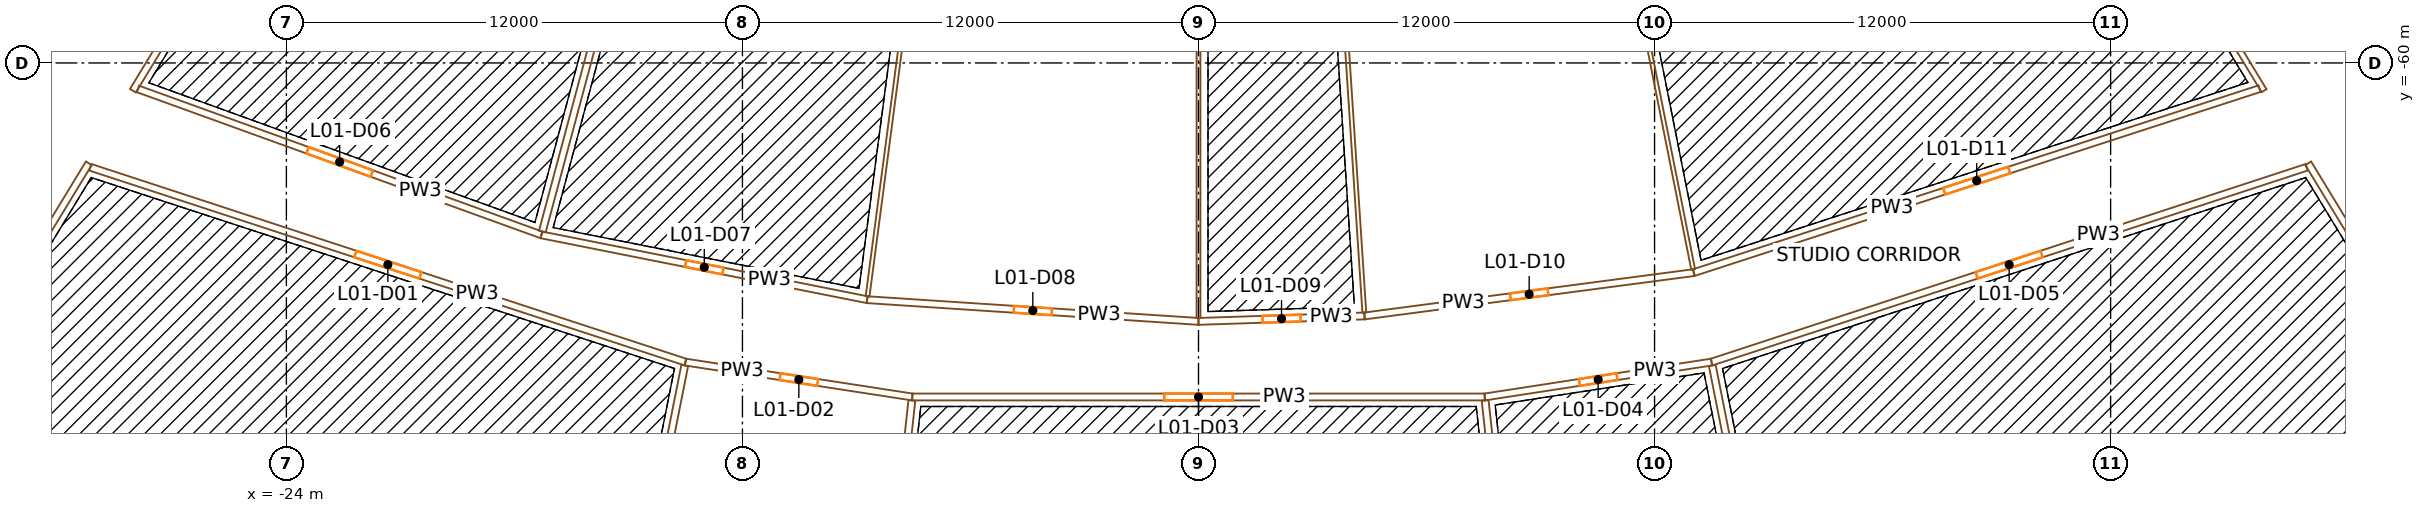
"""IFC4 building model, lengths in metres.
Left out: names, types, materials, properties, quantities, classifications, styles, units other than length and angle.
Written with IfcOpenShell. Run it as: python <this file> out.ifc"""

import sys

from ifc_helpers import new_model, si_unit, direction, frame, frame_2d, origin, place, context, subcontext, project, spatial, rectangle, extrude, element, fill, save


model = new_model("IFC4")
c1 = context("Model", 3, precision=1e-05, world=origin(), true_north=direction((0.0, 1.0)))
c2 = subcontext(c1, "Body", "Model", "MODEL_VIEW")
j1 = project(units=[si_unit("LENGTHUNIT", "METRE"), si_unit("PLANEANGLEUNIT", "RADIAN")], contexts=[c1])
p1 = place(None, origin())
s1 = spatial("IfcSite", under=j1, at=p1, CompositionType="ELEMENT")
p2 = place(p1, origin())
s2 = spatial("IfcBuilding", under=s1, at=p2, CompositionType="ELEMENT")
p3 = place(p2, frame((0.0, 0.0, 9.0)))
s3 = spatial("IfcBuildingStorey", under=s2, at=p3, CompositionType="ELEMENT", Elevation=9.0)
p4 = place(p3, frame((-36.717, -66.337, 0.0), z_axis=(0.0, 0.0, 1.0), x_axis=(0.573577477574, 0.819151315216, 0.0)))
e1 = element("IfcWall", 1, at=p4, inside=s3, PredefinedType="SHEAR", context=c2, shape_type="SweptSolid", body=[
    extrude(rectangle(XDim=14.8, YDim=0.9, at=frame_2d((7.4, 0.0))), origin(), (0.0, 0.0, 1.0), 8.6),
])
p5 = place(p4, frame((6.2, 0.0, 0.0)))
e2 = element("IfcOpeningElement", 2, at=p5, cuts=e1, PredefinedType="OPENING", context=c2, shape_type="SweptSolid", body=[
    extrude(rectangle(XDim=2.4, YDim=2.1, at=frame_2d((1.2, 1.05))), frame((0.0, 0.46, 0.0), z_axis=(0.0, -1.0, 0.0), x_axis=(1.0, 0.0, 0.0)), (0.0, 0.0, 1.0), 0.92),
])
p6 = place(p3, frame((36.717, -66.337, 0.0), z_axis=(0.0, 0.0, 1.0), x_axis=(-0.573577477574, 0.819151315216, 0.0)))
e3 = element("IfcWall", 3, at=p6, inside=s3, PredefinedType="SHEAR", context=c2, shape_type="SweptSolid", body=[
    extrude(rectangle(XDim=14.8, YDim=0.9, at=frame_2d((7.4, 0.0))), origin(), (0.0, 0.0, 1.0), 8.6),
])
p7 = place(p6, frame((6.2, 0.0, 0.0)))
e4 = element("IfcOpeningElement", 4, at=p7, cuts=e3, PredefinedType="OPENING", context=c2, shape_type="SweptSolid", body=[
    extrude(rectangle(XDim=2.4, YDim=2.1, at=frame_2d((1.2, 1.05))), frame((0.0, 0.46, 0.0), z_axis=(0.0, -1.0, 0.0), x_axis=(1.0, 0.0, 0.0)), (0.0, 0.0, 1.0), 0.92),
])
p8 = place(p3, frame((-29.199, -62.639, 0.0), z_axis=(0.0, 0.0, 1.0), x_axis=(-0.519569231187, -0.854428355103, 0.0)))
e5 = element("IfcWall", 5, at=p8, inside=s3, PredefinedType="PARTITIONING", context=c2, shape_type="SweptSolid", body=[
    extrude(rectangle(XDim=9.741, YDim=0.18, at=frame_2d((4.871, 0.0))), origin(), (0.0, 0.0, 1.0), 7.6),
])
p9 = place(p3, frame((-13.5, -67.87, 0.0), z_axis=(0.0, 0.0, 1.0), x_axis=(-0.95037928892, 0.31109356662, 0.0)))
e6 = element("IfcWall", 6, at=p9, inside=s3, PredefinedType="PARTITIONING", context=c2, shape_type="SweptSolid", body=[
    extrude(rectangle(XDim=16.477, YDim=0.18, at=frame_2d((8.239, 0.0))), origin(), (0.0, 0.0, 1.0), 7.6),
])
p10 = place(p9, frame((7.339, 0.0, 0.0)))
e7 = element("IfcOpeningElement", 7, at=p10, cuts=e6, PredefinedType="OPENING", context=c2, shape_type="SweptSolid", body=[
    extrude(rectangle(XDim=1.8, YDim=2.4, at=frame_2d((0.9, 1.2))), frame((0.0, 0.1, 0.0), z_axis=(0.0, -1.0, 0.0), x_axis=(1.0, 0.0, 0.0)), (0.0, 0.0, 1.0), 0.2),
])
p11 = place(p3, frame((-27.906, -60.683, 0.0), z_axis=(0.0, 0.0, 1.0), x_axis=(0.94036474664, -0.340167816345, 0.0)))
e8 = element("IfcWall", 8, at=p11, inside=s3, PredefinedType="PARTITIONING", context=c2, shape_type="SweptSolid", body=[
    extrude(rectangle(XDim=11.29, YDim=0.18, at=frame_2d((5.645, 0.0))), origin(), (0.0, 0.0, 1.0), 7.6),
])
p12 = place(p11, frame((4.745, 0.0, 0.0)))
e9 = element("IfcOpeningElement", 9, at=p12, cuts=e8, PredefinedType="OPENING", context=c2, shape_type="SweptSolid", body=[
    extrude(rectangle(XDim=1.8, YDim=2.1, at=frame_2d((0.9, 1.05))), frame((0.0, 0.1, 0.0), z_axis=(0.0, -1.0, 0.0), x_axis=(1.0, 0.0, 0.0)), (0.0, 0.0, 1.0), 0.2),
])
p13 = place(p3, frame((-23.174, -52.732, 0.0), z_axis=(0.0, 0.0, 1.0), x_axis=(-0.519584464565, -0.854419091654, 0.0)))
e10 = element("IfcWall", 10, at=p13, inside=s3, PredefinedType="PARTITIONING", context=c2, shape_type="SweptSolid", body=[
    extrude(rectangle(XDim=9.36, YDim=0.18, at=frame_2d((4.68, 0.0))), origin(), (0.0, 0.0, 1.0), 7.6),
])
p14 = place(p3, frame((-17.289, -64.524, 0.0), z_axis=(0.0, 0.0, 1.0), x_axis=(0.980786466832, -0.195084357342, 0.0)))
e11 = element("IfcWall", 11, at=p14, inside=s3, PredefinedType="PARTITIONING", context=c2, shape_type="SweptSolid", body=[
    extrude(rectangle(XDim=8.738, YDim=0.18, at=frame_2d((4.369, 0.0))), origin(), (0.0, 0.0, 1.0), 7.6),
])
p15 = place(p14, frame((3.869, 0.0, 0.0)))
e12 = element("IfcOpeningElement", 12, at=p15, cuts=e11, PredefinedType="OPENING", context=c2, shape_type="SweptSolid", body=[
    extrude(rectangle(XDim=1.0, YDim=2.1, at=frame_2d((0.5, 1.05))), frame((0.0, 0.1, 0.0), z_axis=(0.0, -1.0, 0.0), x_axis=(1.0, 0.0, 0.0)), (0.0, 0.0, 1.0), 0.2),
])
p16 = place(p3, frame((-16.739, -84.151, 0.0), z_axis=(0.0, 0.0, 1.0), x_axis=(0.195089444663, 0.980785454919, 0.0)))
e13 = element("IfcWall", 13, at=p16, inside=s3, PredefinedType="PARTITIONING", context=c2, shape_type="SweptSolid", body=[
    extrude(rectangle(XDim=16.51, YDim=0.18, at=frame_2d((8.255, 0.0))), origin(), (0.0, 0.0, 1.0), 7.6),
])
p17 = place(p3, frame((-7.532, -68.789, 0.0), z_axis=(0.0, 0.0, 1.0), x_axis=(-0.98836608834, 0.152093640297, 0.0)))
e14 = element("IfcWall", 14, at=p17, inside=s3, PredefinedType="PARTITIONING", context=c2, shape_type="SweptSolid", body=[
    extrude(rectangle(XDim=6.039, YDim=0.18, at=frame_2d((3.02, 0.0))), origin(), (0.0, 0.0, 1.0), 7.6),
])
p18 = place(p17, frame((2.52, 0.0, 0.0)))
e15 = element("IfcOpeningElement", 15, at=p18, cuts=e14, PredefinedType="OPENING", context=c2, shape_type="SweptSolid", body=[
    extrude(rectangle(XDim=1.0, YDim=2.1, at=frame_2d((0.5, 1.05))), frame((0.0, 0.1, 0.0), z_axis=(0.0, -1.0, 0.0), x_axis=(1.0, 0.0, 0.0)), (0.0, 0.0, 1.0), 0.2),
])
p19 = place(p3, frame((-12.965, -48.386, 0.0), z_axis=(0.0, 0.0, 1.0), x_axis=(-0.258822009397, -0.965925032004, 0.0)))
e16 = element("IfcWall", 16, at=p19, inside=s3, PredefinedType="PARTITIONING", context=c2, shape_type="SweptSolid", body=[
    extrude(rectangle(XDim=16.617, YDim=0.18, at=frame_2d((8.308, 0.0))), origin(), (0.0, 0.0, 1.0), 7.6),
])
p20 = place(p3, frame((-9.321, -85.127, 0.0), z_axis=(0.0, 0.0, 1.0), x_axis=(0.108837977541, 0.994059502568, 0.0)))
e17 = element("IfcWall", 17, at=p20, inside=s3, PredefinedType="PARTITIONING", context=c2, shape_type="SweptSolid", body=[
    extrude(rectangle(XDim=16.346, YDim=0.18, at=frame_2d((8.173, 0.0))), origin(), (0.0, 0.0, 1.0), 7.6),
])
p21 = place(p3, frame((-8.719, -66.229, 0.0), z_axis=(0.0, 0.0, 1.0), x_axis=(0.997858593599, -0.065408158359, 0.0)))
e18 = element("IfcWall", 18, at=p21, inside=s3, PredefinedType="PARTITIONING", context=c2, shape_type="SweptSolid", body=[
    extrude(rectangle(XDim=8.738, YDim=0.18, at=frame_2d((4.369, 0.0))), origin(), (0.0, 0.0, 1.0), 7.6),
])
p22 = place(p21, frame((3.869, 0.0, 0.0)))
e19 = element("IfcOpeningElement", 19, at=p22, cuts=e18, PredefinedType="OPENING", context=c2, shape_type="SweptSolid", body=[
    extrude(rectangle(XDim=1.0, YDim=2.1, at=frame_2d((0.5, 1.05))), frame((0.0, 0.1, 0.0), z_axis=(0.0, -1.0, 0.0), x_axis=(1.0, 0.0, 0.0)), (0.0, 0.0, 1.0), 0.2),
])
p23 = place(p3, frame((7.532, -68.789, 0.0), z_axis=(0.0, 0.0, 1.0), x_axis=(-1.0, 0.0, 0.0)))
e20 = element("IfcWall", 20, at=p23, inside=s3, PredefinedType="PARTITIONING", context=c2, shape_type="SweptSolid", body=[
    extrude(rectangle(XDim=15.063, YDim=0.18, at=frame_2d((7.532, 0.0))), origin(), (0.0, 0.0, 1.0), 7.6),
])
p24 = place(p23, frame((6.632, 0.0, 0.0)))
e21 = element("IfcOpeningElement", 21, at=p24, cuts=e20, PredefinedType="OPENING", context=c2, shape_type="SweptSolid", body=[
    extrude(rectangle(XDim=1.8, YDim=2.4, at=frame_2d((0.9, 1.2))), frame((0.0, 0.1, 0.0), z_axis=(0.0, -1.0, 0.0), x_axis=(1.0, 0.0, 0.0)), (0.0, 0.0, 1.0), 0.2),
])
p25 = place(p3, frame((-6.539, -49.665, 0.0), z_axis=(0.0, 0.0, 1.0), x_axis=(-0.130529385637, -0.991444440947, 0.0)))
e22 = element("IfcWall", 22, at=p25, inside=s3, PredefinedType="PARTITIONING", context=c2, shape_type="SweptSolid", body=[
    extrude(rectangle(XDim=16.616, YDim=0.1, at=frame_2d((8.308, 0.0))), origin(), (0.0, 0.0, 1.0), 7.6),
])
p26 = place(p3, frame((0.0, -66.8, 0.0), z_axis=(0.0, 0.0, 1.0), x_axis=(0.99946426167, 0.03272903366, 0.0)))
e23 = element("IfcWall", 23, at=p26, inside=s3, PredefinedType="PARTITIONING", context=c2, shape_type="SweptSolid", body=[
    extrude(rectangle(XDim=4.371, YDim=0.18, at=frame_2d((2.186, 0.0))), origin(), (0.0, 0.0, 1.0), 7.6),
])
p27 = place(p26, frame((1.686, 0.0, 0.0)))
e24 = element("IfcOpeningElement", 24, at=p27, cuts=e23, PredefinedType="OPENING", context=c2, shape_type="SweptSolid", body=[
    extrude(rectangle(XDim=1.0, YDim=2.1, at=frame_2d((0.5, 1.05))), frame((0.0, 0.1, 0.0), z_axis=(0.0, -1.0, 0.0), x_axis=(1.0, 0.0, 0.0)), (0.0, 0.0, 1.0), 0.2),
])
p28 = place(p3, frame((0.0, -50.094, 0.0), z_axis=(0.0, 0.0, 1.0), x_axis=(0.0, -1.0, 0.0)))
e25 = element("IfcWall", 25, at=p28, inside=s3, PredefinedType="PARTITIONING", context=c2, shape_type="SweptSolid", body=[
    extrude(rectangle(XDim=16.616, YDim=0.1, at=frame_2d((8.308, 0.0))), origin(), (0.0, 0.0, 1.0), 7.6),
])
p29 = place(p3, frame((3.283, -50.093, 0.0), z_axis=(0.0, 0.0, 1.0), x_axis=(0.065405001109, -0.997858800547, 0.0)))
e26 = element("IfcWall", 26, at=p29, inside=s3, PredefinedType="PARTITIONING", context=c2, shape_type="SweptSolid", body=[
    extrude(rectangle(XDim=16.51, YDim=0.1, at=frame_2d((8.255, 0.0))), origin(), (0.0, 0.0, 1.0), 7.6),
])
p30 = place(p3, frame((4.369, -66.657, 0.0), z_axis=(0.0, 0.0, 1.0), x_axis=(0.991443260322, 0.130538352841, 0.0)))
e27 = element("IfcWall", 27, at=p30, inside=s3, PredefinedType="PARTITIONING", context=c2, shape_type="SweptSolid", body=[
    extrude(rectangle(XDim=8.738, YDim=0.18, at=frame_2d((4.369, 0.0))), origin(), (0.0, 0.0, 1.0), 7.6),
])
p31 = place(p30, frame((3.869, 0.0, 0.0)))
e28 = element("IfcOpeningElement", 28, at=p31, cuts=e27, PredefinedType="OPENING", context=c2, shape_type="SweptSolid", body=[
    extrude(rectangle(XDim=1.0, YDim=2.1, at=frame_2d((0.5, 1.05))), frame((0.0, 0.1, 0.0), z_axis=(0.0, -1.0, 0.0), x_axis=(1.0, 0.0, 0.0)), (0.0, 0.0, 1.0), 0.2),
])
p32 = place(p3, frame((13.5, -67.87, 0.0), z_axis=(0.0, 0.0, 1.0), x_axis=(-0.98836608834, -0.152093640297, 0.0)))
e29 = element("IfcWall", 29, at=p32, inside=s3, PredefinedType="PARTITIONING", context=c2, shape_type="SweptSolid", body=[
    extrude(rectangle(XDim=6.039, YDim=0.18, at=frame_2d((3.02, 0.0))), origin(), (0.0, 0.0, 1.0), 7.6),
])
p33 = place(p32, frame((2.52, 0.0, 0.0)))
e30 = element("IfcOpeningElement", 30, at=p33, cuts=e29, PredefinedType="OPENING", context=c2, shape_type="SweptSolid", body=[
    extrude(rectangle(XDim=1.0, YDim=2.1, at=frame_2d((0.5, 1.05))), frame((0.0, 0.1, 0.0), z_axis=(0.0, -1.0, 0.0), x_axis=(1.0, 0.0, 0.0)), (0.0, 0.0, 1.0), 0.2),
])
p34 = place(p3, frame((9.321, -85.127, 0.0), z_axis=(0.0, 0.0, 1.0), x_axis=(-0.108837977541, 0.994059502568, 0.0)))
e31 = element("IfcWall", 31, at=p34, inside=s3, PredefinedType="PARTITIONING", context=c2, shape_type="SweptSolid", body=[
    extrude(rectangle(XDim=16.346, YDim=0.18, at=frame_2d((8.173, 0.0))), origin(), (0.0, 0.0, 1.0), 7.6),
])
p35 = place(p3, frame((9.793, -49.235, 0.0), z_axis=(0.0, 0.0, 1.0), x_axis=(0.195089444663, -0.980785454919, 0.0)))
e32 = element("IfcWall", 32, at=p35, inside=s3, PredefinedType="PARTITIONING", context=c2, shape_type="SweptSolid", body=[
    extrude(rectangle(XDim=16.51, YDim=0.1, at=frame_2d((8.255, 0.0))), origin(), (0.0, 0.0, 1.0), 7.6),
])
p36 = place(p3, frame((13.032, -65.516, 0.0), z_axis=(0.0, 0.0, 1.0), x_axis=(0.950996699022, 0.309201032419, 0.0)))
e33 = element("IfcWall", 33, at=p36, inside=s3, PredefinedType="PARTITIONING", context=c2, shape_type="SweptSolid", body=[
    extrude(rectangle(XDim=15.654, YDim=0.18, at=frame_2d((7.827, 0.0))), origin(), (0.0, 0.0, 1.0), 7.6),
])
p37 = place(p36, frame((6.927, 0.0, 0.0)))
e34 = element("IfcOpeningElement", 34, at=p37, cuts=e33, PredefinedType="OPENING", context=c2, shape_type="SweptSolid", body=[
    extrude(rectangle(XDim=1.8, YDim=2.1, at=frame_2d((0.9, 1.05))), frame((0.0, 0.1, 0.0), z_axis=(0.0, -1.0, 0.0), x_axis=(1.0, 0.0, 0.0)), (0.0, 0.0, 1.0), 0.2),
])
p38 = place(p3, frame((29.16, -62.744, 0.0), z_axis=(0.0, 0.0, 1.0), x_axis=(-0.95037928892, -0.31109356662, 0.0)))
e35 = element("IfcWall", 35, at=p38, inside=s3, PredefinedType="PARTITIONING", context=c2, shape_type="SweptSolid", body=[
    extrude(rectangle(XDim=16.477, YDim=0.18, at=frame_2d((8.239, 0.0))), origin(), (0.0, 0.0, 1.0), 7.6),
])
p39 = place(p38, frame((7.339, 0.0, 0.0)))
e36 = element("IfcOpeningElement", 36, at=p39, cuts=e35, PredefinedType="OPENING", context=c2, shape_type="SweptSolid", body=[
    extrude(rectangle(XDim=1.8, YDim=2.4, at=frame_2d((0.9, 1.2))), frame((0.0, 0.1, 0.0), z_axis=(0.0, -1.0, 0.0), x_axis=(1.0, 0.0, 0.0)), (0.0, 0.0, 1.0), 0.2),
])
p40 = place(p3, frame((16.739, -84.151, 0.0), z_axis=(0.0, 0.0, 1.0), x_axis=(-0.195089444663, 0.980785454919, 0.0)))
e37 = element("IfcWall", 37, at=p40, inside=s3, PredefinedType="PARTITIONING", context=c2, shape_type="SweptSolid", body=[
    extrude(rectangle(XDim=16.51, YDim=0.18, at=frame_2d((8.255, 0.0))), origin(), (0.0, 0.0, 1.0), 7.6),
])
p41 = place(p3, frame((23.174, -52.732, 0.0), z_axis=(0.0, 0.0, 1.0), x_axis=(0.519584464565, -0.854419091654, 0.0)))
e38 = element("IfcWall", 38, at=p41, inside=s3, PredefinedType="PARTITIONING", context=c2, shape_type="SweptSolid", body=[
    extrude(rectangle(XDim=9.36, YDim=0.15, at=frame_2d((4.68, 0.0))), origin(), (0.0, 0.0, 1.0), 7.6),
])
p42 = place(p3, frame((29.199, -62.639, 0.0), z_axis=(0.0, 0.0, 1.0), x_axis=(0.519569231187, -0.854428355103, 0.0)))
e39 = element("IfcWall", 39, at=p42, inside=s3, PredefinedType="PARTITIONING", context=c2, shape_type="SweptSolid", body=[
    extrude(rectangle(XDim=9.741, YDim=0.18, at=frame_2d((4.871, 0.0))), origin(), (0.0, 0.0, 1.0), 7.6),
])
p43 = place(p10, origin())
e40 = element("IfcDoor", 40, at=p43, inside=s3, OperationType="DOUBLE_DOOR_SINGLE_SWING", PredefinedType="DOOR", context=c2, shape_type="SweptSolid", body=[
    extrude(rectangle(XDim=1.8, YDim=2.4, at=frame_2d((0.9, 1.2))), frame((0.0, 0.025, 0.0), z_axis=(0.0, -1.0, 0.0), x_axis=(1.0, 0.0, 0.0)), (0.0, 0.0, 1.0), 0.05),
])
fill(e7, e40)
p44 = place(p18, origin())
e41 = element("IfcDoor", 41, at=p44, inside=s3, OperationType="SINGLE_SWING_RIGHT", PredefinedType="DOOR", context=c2, shape_type="SweptSolid", body=[
    extrude(rectangle(XDim=1.0, YDim=2.1, at=frame_2d((0.5, 1.05))), frame((0.0, 0.025, 0.0), z_axis=(0.0, -1.0, 0.0), x_axis=(1.0, 0.0, 0.0)), (0.0, 0.0, 1.0), 0.05),
])
fill(e15, e41)
p45 = place(p24, origin())
e42 = element("IfcDoor", 42, at=p45, inside=s3, OperationType="DOUBLE_DOOR_SINGLE_SWING", PredefinedType="DOOR", context=c2, shape_type="SweptSolid", body=[
    extrude(rectangle(XDim=1.8, YDim=2.4, at=frame_2d((0.9, 1.2))), frame((0.0, 0.025, 0.0), z_axis=(0.0, -1.0, 0.0), x_axis=(1.0, 0.0, 0.0)), (0.0, 0.0, 1.0), 0.05),
])
fill(e21, e42)
p46 = place(p33, origin())
e43 = element("IfcDoor", 43, at=p46, inside=s3, OperationType="SINGLE_SWING_RIGHT", PredefinedType="DOOR", context=c2, shape_type="SweptSolid", body=[
    extrude(rectangle(XDim=1.0, YDim=2.1, at=frame_2d((0.5, 1.05))), frame((0.0, 0.025, 0.0), z_axis=(0.0, -1.0, 0.0), x_axis=(1.0, 0.0, 0.0)), (0.0, 0.0, 1.0), 0.05),
])
fill(e30, e43)
p47 = place(p39, origin())
e44 = element("IfcDoor", 44, at=p47, inside=s3, OperationType="DOUBLE_DOOR_SINGLE_SWING", PredefinedType="DOOR", context=c2, shape_type="SweptSolid", body=[
    extrude(rectangle(XDim=1.8, YDim=2.4, at=frame_2d((0.9, 1.2))), frame((0.0, 0.025, 0.0), z_axis=(0.0, -1.0, 0.0), x_axis=(1.0, 0.0, 0.0)), (0.0, 0.0, 1.0), 0.05),
])
fill(e36, e44)
p48 = place(p12, origin())
e45 = element("IfcDoor", 45, at=p48, inside=s3, OperationType="DOUBLE_DOOR_SINGLE_SWING", PredefinedType="DOOR", context=c2, shape_type="SweptSolid", body=[
    extrude(rectangle(XDim=1.8, YDim=2.1, at=frame_2d((0.9, 1.05))), frame((0.0, 0.025, 0.0), z_axis=(0.0, -1.0, 0.0), x_axis=(1.0, 0.0, 0.0)), (0.0, 0.0, 1.0), 0.05),
])
fill(e9, e45)
p49 = place(p15, origin())
e46 = element("IfcDoor", 46, at=p49, inside=s3, OperationType="SINGLE_SWING_RIGHT", PredefinedType="DOOR", context=c2, shape_type="SweptSolid", body=[
    extrude(rectangle(XDim=1.0, YDim=2.1, at=frame_2d((0.5, 1.05))), frame((0.0, 0.025, 0.0), z_axis=(0.0, -1.0, 0.0), x_axis=(1.0, 0.0, 0.0)), (0.0, 0.0, 1.0), 0.05),
])
fill(e12, e46)
p50 = place(p22, origin())
e47 = element("IfcDoor", 47, at=p50, inside=s3, OperationType="SINGLE_SWING_RIGHT", PredefinedType="DOOR", context=c2, shape_type="SweptSolid", body=[
    extrude(rectangle(XDim=1.0, YDim=2.1, at=frame_2d((0.5, 1.05))), frame((0.0, 0.025, 0.0), z_axis=(0.0, -1.0, 0.0), x_axis=(1.0, 0.0, 0.0)), (0.0, 0.0, 1.0), 0.05),
])
fill(e19, e47)
p51 = place(p27, origin())
e48 = element("IfcDoor", 48, at=p51, inside=s3, OperationType="SINGLE_SWING_RIGHT", PredefinedType="DOOR", context=c2, shape_type="SweptSolid", body=[
    extrude(rectangle(XDim=1.0, YDim=2.1, at=frame_2d((0.5, 1.05))), frame((0.0, 0.025, 0.0), z_axis=(0.0, -1.0, 0.0), x_axis=(1.0, 0.0, 0.0)), (0.0, 0.0, 1.0), 0.05),
])
fill(e24, e48)
p52 = place(p31, origin())
e49 = element("IfcDoor", 49, at=p52, inside=s3, OperationType="SINGLE_SWING_RIGHT", PredefinedType="DOOR", context=c2, shape_type="SweptSolid", body=[
    extrude(rectangle(XDim=1.0, YDim=2.1, at=frame_2d((0.5, 1.05))), frame((0.0, 0.025, 0.0), z_axis=(0.0, -1.0, 0.0), x_axis=(1.0, 0.0, 0.0)), (0.0, 0.0, 1.0), 0.05),
])
fill(e28, e49)
p53 = place(p37, origin())
e50 = element("IfcDoor", 50, at=p53, inside=s3, OperationType="DOUBLE_DOOR_SINGLE_SWING", PredefinedType="DOOR", context=c2, shape_type="SweptSolid", body=[
    extrude(rectangle(XDim=1.8, YDim=2.1, at=frame_2d((0.9, 1.05))), frame((0.0, 0.025, 0.0), z_axis=(0.0, -1.0, 0.0), x_axis=(1.0, 0.0, 0.0)), (0.0, 0.0, 1.0), 0.05),
])
fill(e34, e50)
save(model, sys.argv[1])
